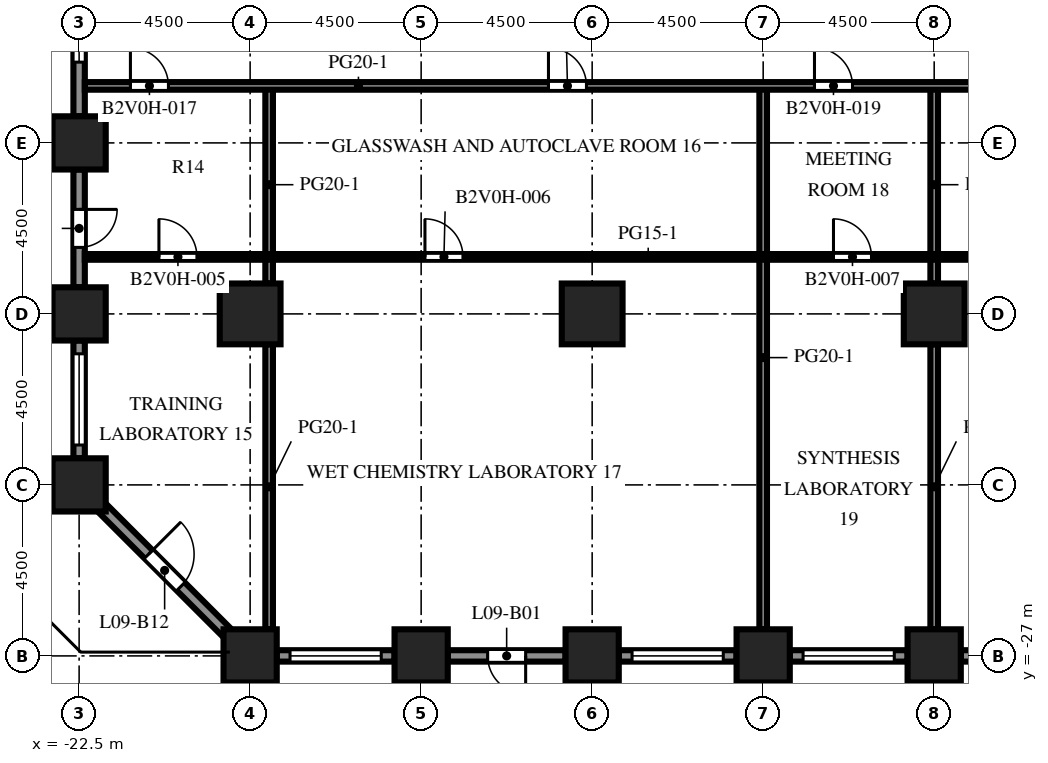
"""IFC4 building model, lengths in metres.
Left out: names, types, materials, properties, quantities, classifications, styles, units other than length and angle.
Written with IfcOpenShell. Run it as: python <this file> out.ifc"""

import sys

from ifc_helpers import new_model, si_unit, direction, frame, frame_2d, origin, origin_2d, place, context, subcontext, project, spatial, rectangle, extrude, element, fill, save


model = new_model("IFC4")
c1 = context("Model", 3, precision=1e-05, world=origin(), true_north=direction((0.0, 1.0)))
c2 = subcontext(c1, "Body", "Model", "MODEL_VIEW")
j1 = project(units=[si_unit("LENGTHUNIT", "METRE"), si_unit("PLANEANGLEUNIT", "RADIAN")], contexts=[c1])
p1 = place(None, origin())
s1 = spatial("IfcSite", under=j1, at=p1, CompositionType="ELEMENT")
p2 = place(p1, origin())
s2 = spatial("IfcBuilding", under=s1, at=p2, CompositionType="ELEMENT")
p3 = place(p2, frame((0.0, 0.0, 41.9)))
s3 = spatial("IfcBuildingStorey", under=s2, at=p3, CompositionType="ELEMENT", Elevation=41.9)
for number, where, z_axis, x_axis in (
    (1, (-22.5, -22.5, -0.45), (0.0, 0.0, 1.0), (1.0, 0.0, 0.0)),
    (2, (-22.5, -18.0, -0.45), (0.0, 0.0, 1.0), (1.0, 0.0, 0.0)),
    (3, (-22.5, -13.5, -0.45), (0.0, 0.0, 1.0), (1.0, 0.0, 0.0)),
):
    element("IfcColumn", number, at=place(p3, frame(where, z_axis=z_axis, x_axis=x_axis)), inside=s3, PredefinedType="COLUMN", context=c2, shape_type="SweptSolid", body=[
        extrude(rectangle(XDim=1.4, YDim=1.4, at=origin_2d()), origin(), (0.0, 0.0, 1.0), 4.55),
    ])
for number, where, z_axis, x_axis in (
    (4, (-18.0, -27.0, 0.0), (0.0, 0.0, 1.0), (1.0, 0.0, 0.0)),
    (5, (-13.5, -27.0, 0.0), (0.0, 0.0, 1.0), (1.0, 0.0, 0.0)),
    (6, (-9.0, -27.0, 0.0), (0.0, 0.0, 1.0), (1.0, 0.0, 0.0)),
    (7, (-4.5, -27.0, 0.0), (0.0, 0.0, 1.0), (1.0, 0.0, 0.0)),
    (8, (0.0, -27.0, 0.0), (0.0, 0.0, 1.0), (1.0, 0.0, 0.0)),
):
    element("IfcColumn", number, at=place(p3, frame(where, z_axis=z_axis, x_axis=x_axis)), inside=s3, PredefinedType="COLUMN", context=c2, shape_type="SweptSolid", body=[
        extrude(rectangle(XDim=1.4, YDim=1.4, at=origin_2d()), origin(), (0.0, 0.0, 1.0), 4.1),
    ])
p4 = place(p3, frame((-18.0, -18.0, -0.45), z_axis=(0.0, 0.0, 1.0), x_axis=(1.0, 0.0, 0.0)))
e9 = element("IfcColumn", 9, at=p4, inside=s3, PredefinedType="COLUMN", context=c2, shape_type="SweptSolid", body=[
    extrude(rectangle(XDim=1.6, YDim=1.6, at=origin_2d()), origin(), (0.0, 0.0, 1.0), 4.55),
])
for number, where, z_axis, x_axis in (
    (10, (-9.0, -18.0, 0.0), (0.0, 0.0, 1.0), (1.0, 0.0, 0.0)),
    (11, (0.0, -18.0, 0.0), (0.0, 0.0, 1.0), (1.0, 0.0, 0.0)),
):
    element("IfcColumn", number, at=place(p3, frame(where, z_axis=z_axis, x_axis=x_axis)), inside=s3, PredefinedType="COLUMN", context=c2, shape_type="SweptSolid", body=[
        extrude(rectangle(XDim=1.6, YDim=1.6, at=origin_2d()), origin(), (0.0, 0.0, 1.0), 4.1),
    ])
p5 = place(p3, frame((-14.2, -27.0, 0.0), z_axis=(0.0, 0.0, 1.0), x_axis=(-1.0, 0.0, 0.0)))
e12 = element("IfcWall", 12, at=p5, inside=s3, PredefinedType="SOLIDWALL", context=c2, shape_type="SweptSolid", body=[
    extrude(rectangle(XDim=3.1, YDim=0.3, at=frame_2d((1.55, 0.0))), origin(), (0.0, 0.0, 1.0), 2.75),
])
p6 = place(p5, frame((0.35, 0.0, 0.8)))
e13 = element("IfcOpeningElement", 13, at=p6, cuts=e12, PredefinedType="OPENING", context=c2, shape_type="SweptSolid", body=[
    extrude(rectangle(XDim=2.4, YDim=1.7, at=frame_2d((1.2, 0.85))), frame((0.0, 0.16, 0.0), z_axis=(0.0, -1.0, 0.0), x_axis=(1.0, 0.0, 0.0)), (0.0, 0.0, 1.0), 0.32),
])
p7 = place(p3, frame((-9.7, -27.0, 0.0), z_axis=(0.0, 0.0, 1.0), x_axis=(-1.0, 0.0, 0.0)))
e14 = element("IfcWall", 14, at=p7, inside=s3, PredefinedType="SOLIDWALL", context=c2, shape_type="SweptSolid", body=[
    extrude(rectangle(XDim=3.1, YDim=0.3, at=frame_2d((1.55, 0.0))), origin(), (0.0, 0.0, 1.0), 2.75),
])
p8 = place(p7, frame((1.05, 0.0, 0.0)))
e15 = element("IfcOpeningElement", 15, at=p8, cuts=e14, PredefinedType="OPENING", context=c2, shape_type="SweptSolid", body=[
    extrude(rectangle(XDim=1.0, YDim=2.2, at=frame_2d((0.5, 1.1))), frame((0.0, 0.16, 0.0), z_axis=(0.0, -1.0, 0.0), x_axis=(1.0, 0.0, 0.0)), (0.0, 0.0, 1.0), 0.32),
])
p9 = place(p3, frame((-5.2, -27.0, 0.0), z_axis=(0.0, 0.0, 1.0), x_axis=(-1.0, 0.0, 0.0)))
e16 = element("IfcWall", 16, at=p9, inside=s3, PredefinedType="SOLIDWALL", context=c2, shape_type="SweptSolid", body=[
    extrude(rectangle(XDim=3.1, YDim=0.3, at=frame_2d((1.55, 0.0))), origin(), (0.0, 0.0, 1.0), 2.75),
])
p10 = place(p9, frame((0.35, 0.0, 0.8)))
e17 = element("IfcOpeningElement", 17, at=p10, cuts=e16, PredefinedType="OPENING", context=c2, shape_type="SweptSolid", body=[
    extrude(rectangle(XDim=2.4, YDim=1.7, at=frame_2d((1.2, 0.85))), frame((0.0, 0.16, 0.0), z_axis=(0.0, -1.0, 0.0), x_axis=(1.0, 0.0, 0.0)), (0.0, 0.0, 1.0), 0.32),
])
p11 = place(p3, frame((-0.7, -27.0, 0.0), z_axis=(0.0, 0.0, 1.0), x_axis=(-1.0, 0.0, 0.0)))
e18 = element("IfcWall", 18, at=p11, inside=s3, PredefinedType="SOLIDWALL", context=c2, shape_type="SweptSolid", body=[
    extrude(rectangle(XDim=3.1, YDim=0.3, at=frame_2d((1.55, 0.0))), origin(), (0.0, 0.0, 1.0), 2.75),
])
p12 = place(p11, frame((0.35, 0.0, 0.8)))
e19 = element("IfcOpeningElement", 19, at=p12, cuts=e18, PredefinedType="OPENING", context=c2, shape_type="SweptSolid", body=[
    extrude(rectangle(XDim=2.4, YDim=1.7, at=frame_2d((1.2, 0.85))), frame((0.0, 0.16, 0.0), z_axis=(0.0, -1.0, 0.0), x_axis=(1.0, 0.0, 0.0)), (0.0, 0.0, 1.0), 0.32),
])
p13 = place(p3, frame((3.8, -27.0, 0.0), z_axis=(0.0, 0.0, 1.0), x_axis=(-1.0, 0.0, 0.0)))
e20 = element("IfcWall", 20, at=p13, inside=s3, PredefinedType="SOLIDWALL", context=c2, shape_type="SweptSolid", body=[
    extrude(rectangle(XDim=3.1, YDim=0.3, at=frame_2d((1.55, 0.0))), origin(), (0.0, 0.0, 1.0), 2.75),
])
p14 = place(p13, frame((0.35, 0.0, 0.8)))
e21 = element("IfcOpeningElement", 21, at=p14, cuts=e20, PredefinedType="OPENING", context=c2, shape_type="SweptSolid", body=[
    extrude(rectangle(XDim=2.4, YDim=1.7, at=frame_2d((1.2, 0.85))), frame((0.0, 0.16, 0.0), z_axis=(0.0, -1.0, 0.0), x_axis=(1.0, 0.0, 0.0)), (0.0, 0.0, 1.0), 0.32),
])
p15 = place(p3, frame((-22.5, -12.8, 0.0), z_axis=(0.0, 0.0, 1.0), x_axis=(0.0, 1.0, 0.0)))
e22 = element("IfcWall", 22, at=p15, inside=s3, PredefinedType="SOLIDWALL", context=c2, shape_type="SweptSolid", body=[
    extrude(rectangle(XDim=3.1, YDim=0.3, at=frame_2d((1.55, 0.0))), origin(), (0.0, 0.0, 1.0), 2.75),
])
p16 = place(p15, frame((1.425, 0.0, 0.8)))
e23 = element("IfcOpeningElement", 23, at=p16, cuts=e22, PredefinedType="OPENING", context=c2, shape_type="SweptSolid", body=[
    extrude(rectangle(XDim=1.2, YDim=1.7, at=frame_2d((0.6, 0.85))), frame((0.0, 0.16, 0.0), z_axis=(0.0, -1.0, 0.0), x_axis=(1.0, 0.0, 0.0)), (0.0, 0.0, 1.0), 0.32),
])
p17 = place(p3, frame((-22.5, -17.3, 0.0), z_axis=(0.0, 0.0, 1.0), x_axis=(0.0, 1.0, 0.0)))
e24 = element("IfcWall", 24, at=p17, inside=s3, PredefinedType="SOLIDWALL", context=c2, shape_type="SweptSolid", body=[
    extrude(rectangle(XDim=3.1, YDim=0.3, at=frame_2d((1.55, 0.0))), origin(), (0.0, 0.0, 1.0), 2.75),
])
p18 = place(p17, frame((1.05, 0.0, 0.0)))
e25 = element("IfcOpeningElement", 25, at=p18, cuts=e24, PredefinedType="OPENING", context=c2, shape_type="SweptSolid", body=[
    extrude(rectangle(XDim=1.0, YDim=2.2, at=frame_2d((0.5, 1.1))), frame((0.0, 0.16, 0.0), z_axis=(0.0, -1.0, 0.0), x_axis=(1.0, 0.0, 0.0)), (0.0, 0.0, 1.0), 0.32),
])
p19 = place(p3, frame((-22.5, -21.8, 0.0), z_axis=(0.0, 0.0, 1.0), x_axis=(0.0, 1.0, 0.0)))
e26 = element("IfcWall", 26, at=p19, inside=s3, PredefinedType="SOLIDWALL", context=c2, shape_type="SweptSolid", body=[
    extrude(rectangle(XDim=3.1, YDim=0.3, at=frame_2d((1.55, 0.0))), origin(), (0.0, 0.0, 1.0), 2.75),
])
p20 = place(p19, frame((0.35, 0.0, 0.8)))
e27 = element("IfcOpeningElement", 27, at=p20, cuts=e26, PredefinedType="OPENING", context=c2, shape_type="SweptSolid", body=[
    extrude(rectangle(XDim=2.4, YDim=1.7, at=frame_2d((1.2, 0.85))), frame((0.0, 0.16, 0.0), z_axis=(0.0, -1.0, 0.0), x_axis=(1.0, 0.0, 0.0)), (0.0, 0.0, 1.0), 0.32),
])
p21 = place(p3, frame((-18.594, -26.406, 0.0), z_axis=(0.0, 0.0, 1.0), x_axis=(-0.707106781187, 0.707106781187, 0.0)))
e28 = element("IfcWall", 28, at=p21, inside=s3, PredefinedType="SOLIDWALL", context=c2, shape_type="SweptSolid", body=[
    extrude(rectangle(XDim=4.684, YDim=0.3, at=frame_2d((2.342, 0.0))), origin(), (0.0, 0.0, 1.0), 2.75),
])
p22 = place(p21, frame((1.742, 0.0, 0.0)))
e29 = element("IfcOpeningElement", 29, at=p22, cuts=e28, PredefinedType="OPENING", context=c2, shape_type="SweptSolid", body=[
    extrude(rectangle(XDim=1.2, YDim=2.2, at=frame_2d((0.6, 1.1))), frame((0.0, 0.16, 0.0), z_axis=(0.0, -1.0, 0.0), x_axis=(1.0, 0.0, 0.0)), (0.0, 0.0, 1.0), 0.32),
])
p23 = place(p3, frame((-17.5, -26.3, 0.0), z_axis=(0.0, 0.0, 1.0), x_axis=(0.0, 1.0, 0.0)))
e30 = element("IfcWall", 30, at=p23, inside=s3, PredefinedType="PARTITIONING", context=c2, shape_type="SweptSolid", body=[
    extrude(rectangle(XDim=7.5, YDim=0.2, at=frame_2d((3.75, 0.0))), origin(), (0.0, 0.0, 1.0), 3.65),
])
p24 = place(p3, frame((-17.5, -17.2, 0.0), z_axis=(0.0, 0.0, 1.0), x_axis=(0.0, 1.0, 0.0)))
e31 = element("IfcWall", 31, at=p24, inside=s3, PredefinedType="PARTITIONING", context=c2, shape_type="SweptSolid", body=[
    extrude(rectangle(XDim=5.2, YDim=0.2, at=frame_2d((2.6, 0.0))), origin(), (0.0, 0.0, 1.0), 3.65),
])
p25 = place(p3, frame((-4.5, -26.3, 0.0), z_axis=(0.0, 0.0, 1.0), x_axis=(0.0, 1.0, 0.0)))
e32 = element("IfcWall", 32, at=p25, inside=s3, PredefinedType="PARTITIONING", context=c2, shape_type="SweptSolid", body=[
    extrude(rectangle(XDim=14.3, YDim=0.2, at=frame_2d((7.15, 0.0))), origin(), (0.0, 0.0, 1.0), 3.65),
])
p26 = place(p3, frame((0.0, -26.3, 0.0), z_axis=(0.0, 0.0, 1.0), x_axis=(0.0, 1.0, 0.0)))
e33 = element("IfcWall", 33, at=p26, inside=s3, PredefinedType="PARTITIONING", context=c2, shape_type="SweptSolid", body=[
    extrude(rectangle(XDim=7.5, YDim=0.2, at=frame_2d((3.75, 0.0))), origin(), (0.0, 0.0, 1.0), 3.65),
])
p27 = place(p3, frame((0.0, -17.2, 0.0), z_axis=(0.0, 0.0, 1.0), x_axis=(0.0, 1.0, 0.0)))
e34 = element("IfcWall", 34, at=p27, inside=s3, PredefinedType="PARTITIONING", context=c2, shape_type="SweptSolid", body=[
    extrude(rectangle(XDim=5.2, YDim=0.2, at=frame_2d((2.6, 0.0))), origin(), (0.0, 0.0, 1.0), 3.65),
])
p28 = place(p3, frame((31.35, -16.5, 0.0), z_axis=(0.0, 0.0, 1.0), x_axis=(-1.0, 0.0, 0.0)))
e35 = element("IfcWall", 35, at=p28, inside=s3, PredefinedType="PARTITIONING", context=c2, shape_type="SweptSolid", body=[
    extrude(rectangle(XDim=53.7, YDim=0.15, at=frame_2d((26.85, 0.0))), origin(), (0.0, 0.0, 1.0), 3.65),
])
p29 = place(p28, frame((50.75, 0.0, 0.0)))
e36 = element("IfcOpeningElement", 36, at=p29, cuts=e35, PredefinedType="OPENING", context=c2, shape_type="SweptSolid", body=[
    extrude(rectangle(XDim=1.0, YDim=2.1, at=frame_2d((0.5, 1.05))), frame((0.0, 0.085, 0.0), z_axis=(0.0, -1.0, 0.0), x_axis=(1.0, 0.0, 0.0)), (0.0, 0.0, 1.0), 0.17),
])
p30 = place(p28, frame((43.75, 0.0, 0.0)))
e37 = element("IfcOpeningElement", 37, at=p30, cuts=e35, PredefinedType="OPENING", context=c2, shape_type="SweptSolid", body=[
    extrude(rectangle(XDim=1.0, YDim=2.1, at=frame_2d((0.5, 1.05))), frame((0.0, 0.085, 0.0), z_axis=(0.0, -1.0, 0.0), x_axis=(1.0, 0.0, 0.0)), (0.0, 0.0, 1.0), 0.17),
])
p31 = place(p28, frame((33.0, 0.0, 0.0)))
e38 = element("IfcOpeningElement", 38, at=p31, cuts=e35, PredefinedType="OPENING", context=c2, shape_type="SweptSolid", body=[
    extrude(rectangle(XDim=1.0, YDim=2.1, at=frame_2d((0.5, 1.05))), frame((0.0, 0.085, 0.0), z_axis=(0.0, -1.0, 0.0), x_axis=(1.0, 0.0, 0.0)), (0.0, 0.0, 1.0), 0.17),
])
p32 = place(p28, frame((26.25, 0.0, 0.0)))
e39 = element("IfcOpeningElement", 39, at=p32, cuts=e35, PredefinedType="OPENING", context=c2, shape_type="SweptSolid", body=[
    extrude(rectangle(XDim=1.0, YDim=2.1, at=frame_2d((0.5, 1.05))), frame((0.0, 0.085, 0.0), z_axis=(0.0, -1.0, 0.0), x_axis=(1.0, 0.0, 0.0)), (0.0, 0.0, 1.0), 0.17),
])
p33 = place(p28, frame((19.75, 0.0, 0.0)))
e40 = element("IfcOpeningElement", 40, at=p33, cuts=e35, PredefinedType="OPENING", context=c2, shape_type="SweptSolid", body=[
    extrude(rectangle(XDim=1.0, YDim=2.1, at=frame_2d((0.5, 1.05))), frame((0.0, 0.085, 0.0), z_axis=(0.0, -1.0, 0.0), x_axis=(1.0, 0.0, 0.0)), (0.0, 0.0, 1.0), 0.17),
])
p34 = place(p28, frame((15.25, 0.0, 0.0)))
e41 = element("IfcOpeningElement", 41, at=p34, cuts=e35, PredefinedType="OPENING", context=c2, shape_type="SweptSolid", body=[
    extrude(rectangle(XDim=1.0, YDim=2.1, at=frame_2d((0.5, 1.05))), frame((0.0, 0.085, 0.0), z_axis=(0.0, -1.0, 0.0), x_axis=(1.0, 0.0, 0.0)), (0.0, 0.0, 1.0), 0.17),
])
p35 = place(p28, frame((10.75, 0.0, 0.0)))
e42 = element("IfcOpeningElement", 42, at=p35, cuts=e35, PredefinedType="OPENING", context=c2, shape_type="SweptSolid", body=[
    extrude(rectangle(XDim=1.0, YDim=2.1, at=frame_2d((0.5, 1.05))), frame((0.0, 0.085, 0.0), z_axis=(0.0, -1.0, 0.0), x_axis=(1.0, 0.0, 0.0)), (0.0, 0.0, 1.0), 0.17),
])
p36 = place(p28, frame((2.5, 0.0, 0.0)))
e43 = element("IfcOpeningElement", 43, at=p36, cuts=e35, PredefinedType="OPENING", context=c2, shape_type="SweptSolid", body=[
    extrude(rectangle(XDim=1.0, YDim=2.1, at=frame_2d((0.5, 1.05))), frame((0.0, 0.085, 0.0), z_axis=(0.0, -1.0, 0.0), x_axis=(1.0, 0.0, 0.0)), (0.0, 0.0, 1.0), 0.17),
])
p37 = place(p3, frame((31.35, -12.0, 0.0), z_axis=(0.0, 0.0, 1.0), x_axis=(-1.0, 0.0, 0.0)))
e44 = element("IfcWall", 44, at=p37, inside=s3, PredefinedType="PARTITIONING", context=c2, shape_type="SweptSolid", body=[
    extrude(rectangle(XDim=53.7, YDim=0.2, at=frame_2d((26.85, 0.0))), origin(), (0.0, 0.0, 1.0), 3.65),
])
p38 = place(p37, frame((51.5, 0.0, 0.0)))
e45 = element("IfcOpeningElement", 45, at=p38, cuts=e44, PredefinedType="OPENING", context=c2, shape_type="SweptSolid", body=[
    extrude(rectangle(XDim=1.0, YDim=2.1, at=frame_2d((0.5, 1.05))), frame((0.0, 0.11, 0.0), z_axis=(0.0, -1.0, 0.0), x_axis=(1.0, 0.0, 0.0)), (0.0, 0.0, 1.0), 0.22),
])
p39 = place(p37, frame((40.5, 0.0, 0.0)))
e46 = element("IfcOpeningElement", 46, at=p39, cuts=e44, PredefinedType="OPENING", context=c2, shape_type="SweptSolid", body=[
    extrude(rectangle(XDim=1.0, YDim=2.1, at=frame_2d((0.5, 1.05))), frame((0.0, 0.11, 0.0), z_axis=(0.0, -1.0, 0.0), x_axis=(1.0, 0.0, 0.0)), (0.0, 0.0, 1.0), 0.22),
])
p40 = place(p37, frame((33.5, 0.0, 0.0)))
e47 = element("IfcOpeningElement", 47, at=p40, cuts=e44, PredefinedType="OPENING", context=c2, shape_type="SweptSolid", body=[
    extrude(rectangle(XDim=1.0, YDim=2.1, at=frame_2d((0.5, 1.05))), frame((0.0, 0.11, 0.0), z_axis=(0.0, -1.0, 0.0), x_axis=(1.0, 0.0, 0.0)), (0.0, 0.0, 1.0), 0.22),
])
p41 = place(p37, frame((25.75, 0.0, 0.0)))
e48 = element("IfcOpeningElement", 48, at=p41, cuts=e44, PredefinedType="OPENING", context=c2, shape_type="SweptSolid", body=[
    extrude(rectangle(XDim=1.0, YDim=2.1, at=frame_2d((0.5, 1.05))), frame((0.0, 0.11, 0.0), z_axis=(0.0, -1.0, 0.0), x_axis=(1.0, 0.0, 0.0)), (0.0, 0.0, 1.0), 0.22),
])
p42 = place(p37, frame((19.75, 0.0, 0.0)))
e49 = element("IfcOpeningElement", 49, at=p42, cuts=e44, PredefinedType="OPENING", context=c2, shape_type="SweptSolid", body=[
    extrude(rectangle(XDim=1.0, YDim=2.1, at=frame_2d((0.5, 1.05))), frame((0.0, 0.11, 0.0), z_axis=(0.0, -1.0, 0.0), x_axis=(1.0, 0.0, 0.0)), (0.0, 0.0, 1.0), 0.22),
])
p43 = place(p37, frame((15.75, 0.0, 0.0)))
e50 = element("IfcOpeningElement", 50, at=p43, cuts=e44, PredefinedType="OPENING", context=c2, shape_type="SweptSolid", body=[
    extrude(rectangle(XDim=1.0, YDim=2.1, at=frame_2d((0.5, 1.05))), frame((0.0, 0.11, 0.0), z_axis=(0.0, -1.0, 0.0), x_axis=(1.0, 0.0, 0.0)), (0.0, 0.0, 1.0), 0.22),
])
p44 = place(p37, frame((10.5, 0.0, 0.0)))
e51 = element("IfcOpeningElement", 51, at=p44, cuts=e44, PredefinedType="OPENING", context=c2, shape_type="SweptSolid", body=[
    extrude(rectangle(XDim=1.0, YDim=2.1, at=frame_2d((0.5, 1.05))), frame((0.0, 0.11, 0.0), z_axis=(0.0, -1.0, 0.0), x_axis=(1.0, 0.0, 0.0)), (0.0, 0.0, 1.0), 0.22),
])
p45 = place(p37, frame((5.25, 0.0, 0.0)))
e52 = element("IfcOpeningElement", 52, at=p45, cuts=e44, PredefinedType="OPENING", context=c2, shape_type="SweptSolid", body=[
    extrude(rectangle(XDim=1.0, YDim=2.1, at=frame_2d((0.5, 1.05))), frame((0.0, 0.11, 0.0), z_axis=(0.0, -1.0, 0.0), x_axis=(1.0, 0.0, 0.0)), (0.0, 0.0, 1.0), 0.22),
])
p46 = place(p6, origin())
e53 = element("IfcWindow", 53, at=p46, inside=s3, PartitioningType="SINGLE_PANEL", PredefinedType="WINDOW", context=c2, shape_type="SweptSolid", body=[
    extrude(rectangle(XDim=2.4, YDim=1.7, at=frame_2d((1.2, 0.85))), frame((0.0, 0.03, 0.0), z_axis=(0.0, -1.0, 0.0), x_axis=(1.0, 0.0, 0.0)), (0.0, 0.0, 1.0), 0.06),
])
fill(e13, e53)
p47 = place(p8, origin())
e54 = element("IfcDoor", 54, at=p47, inside=s3, OperationType="SINGLE_SWING_LEFT", PredefinedType="DOOR", context=c2, shape_type="SweptSolid", body=[
    extrude(rectangle(XDim=1.0, YDim=2.2, at=frame_2d((0.5, 1.1))), frame((0.0, 0.025, 0.0), z_axis=(0.0, -1.0, 0.0), x_axis=(1.0, 0.0, 0.0)), (0.0, 0.0, 1.0), 0.05),
])
fill(e15, e54)
p48 = place(p10, origin())
e55 = element("IfcWindow", 55, at=p48, inside=s3, PartitioningType="SINGLE_PANEL", PredefinedType="WINDOW", context=c2, shape_type="SweptSolid", body=[
    extrude(rectangle(XDim=2.4, YDim=1.7, at=frame_2d((1.2, 0.85))), frame((0.0, 0.03, 0.0), z_axis=(0.0, -1.0, 0.0), x_axis=(1.0, 0.0, 0.0)), (0.0, 0.0, 1.0), 0.06),
])
fill(e17, e55)
p49 = place(p12, origin())
e56 = element("IfcWindow", 56, at=p49, inside=s3, PartitioningType="SINGLE_PANEL", PredefinedType="WINDOW", context=c2, shape_type="SweptSolid", body=[
    extrude(rectangle(XDim=2.4, YDim=1.7, at=frame_2d((1.2, 0.85))), frame((0.0, 0.03, 0.0), z_axis=(0.0, -1.0, 0.0), x_axis=(1.0, 0.0, 0.0)), (0.0, 0.0, 1.0), 0.06),
])
fill(e19, e56)
p50 = place(p16, origin())
e57 = element("IfcWindow", 57, at=p50, inside=s3, PartitioningType="SINGLE_PANEL", PredefinedType="WINDOW", context=c2, shape_type="SweptSolid", body=[
    extrude(rectangle(XDim=1.2, YDim=1.7, at=frame_2d((0.6, 0.85))), frame((0.0, 0.03, 0.0), z_axis=(0.0, -1.0, 0.0), x_axis=(1.0, 0.0, 0.0)), (0.0, 0.0, 1.0), 0.06),
])
fill(e23, e57)
p51 = place(p18, origin())
e58 = element("IfcDoor", 58, at=p51, inside=s3, OperationType="SINGLE_SWING_RIGHT", PredefinedType="DOOR", context=c2, shape_type="SweptSolid", body=[
    extrude(rectangle(XDim=1.0, YDim=2.2, at=frame_2d((0.5, 1.1))), frame((0.0, 0.025, 0.0), z_axis=(0.0, -1.0, 0.0), x_axis=(1.0, 0.0, 0.0)), (0.0, 0.0, 1.0), 0.05),
])
fill(e25, e58)
p52 = place(p20, origin())
e59 = element("IfcWindow", 59, at=p52, inside=s3, PartitioningType="SINGLE_PANEL", PredefinedType="WINDOW", context=c2, shape_type="SweptSolid", body=[
    extrude(rectangle(XDim=2.4, YDim=1.7, at=frame_2d((1.2, 0.85))), frame((0.0, 0.03, 0.0), z_axis=(0.0, -1.0, 0.0), x_axis=(1.0, 0.0, 0.0)), (0.0, 0.0, 1.0), 0.06),
])
fill(e27, e59)
p53 = place(p22, origin())
e60 = element("IfcDoor", 60, at=p53, inside=s3, OperationType="SINGLE_SWING_RIGHT", PredefinedType="DOOR", context=c2, shape_type="SweptSolid", body=[
    extrude(rectangle(XDim=1.2, YDim=2.2, at=frame_2d((0.6, 1.1))), frame((0.0, 0.025, 0.0), z_axis=(0.0, -1.0, 0.0), x_axis=(1.0, 0.0, 0.0)), (0.0, 0.0, 1.0), 0.05),
])
fill(e29, e60)
p54 = place(p29, origin())
e61 = element("IfcDoor", 61, at=p54, inside=s3, OperationType="SINGLE_SWING_RIGHT", PredefinedType="DOOR", context=c2, shape_type="SweptSolid", body=[
    extrude(rectangle(XDim=1.0, YDim=2.1, at=frame_2d((0.5, 1.05))), frame((0.0, 0.025, 0.0), z_axis=(0.0, -1.0, 0.0), x_axis=(1.0, 0.0, 0.0)), (0.0, 0.0, 1.0), 0.05),
])
fill(e36, e61)
p55 = place(p30, origin())
e62 = element("IfcDoor", 62, at=p55, inside=s3, OperationType="SINGLE_SWING_RIGHT", PredefinedType="DOOR", context=c2, shape_type="SweptSolid", body=[
    extrude(rectangle(XDim=1.0, YDim=2.1, at=frame_2d((0.5, 1.05))), frame((0.0, 0.025, 0.0), z_axis=(0.0, -1.0, 0.0), x_axis=(1.0, 0.0, 0.0)), (0.0, 0.0, 1.0), 0.05),
])
fill(e37, e62)
p56 = place(p31, origin())
e63 = element("IfcDoor", 63, at=p56, inside=s3, OperationType="SINGLE_SWING_RIGHT", PredefinedType="DOOR", context=c2, shape_type="SweptSolid", body=[
    extrude(rectangle(XDim=1.0, YDim=2.1, at=frame_2d((0.5, 1.05))), frame((0.0, 0.025, 0.0), z_axis=(0.0, -1.0, 0.0), x_axis=(1.0, 0.0, 0.0)), (0.0, 0.0, 1.0), 0.05),
])
fill(e38, e63)
p57 = place(p38, origin())
e64 = element("IfcDoor", 64, at=p57, inside=s3, OperationType="SINGLE_SWING_RIGHT", PredefinedType="DOOR", context=c2, shape_type="SweptSolid", body=[
    extrude(rectangle(XDim=1.0, YDim=2.1, at=frame_2d((0.5, 1.05))), frame((0.0, 0.025, 0.0), z_axis=(0.0, -1.0, 0.0), x_axis=(1.0, 0.0, 0.0)), (0.0, 0.0, 1.0), 0.05),
])
fill(e45, e64)
p58 = place(p39, origin())
e65 = element("IfcDoor", 65, at=p58, inside=s3, OperationType="SINGLE_SWING_RIGHT", PredefinedType="DOOR", context=c2, shape_type="SweptSolid", body=[
    extrude(rectangle(XDim=1.0, YDim=2.1, at=frame_2d((0.5, 1.05))), frame((0.0, 0.025, 0.0), z_axis=(0.0, -1.0, 0.0), x_axis=(1.0, 0.0, 0.0)), (0.0, 0.0, 1.0), 0.05),
])
fill(e46, e65)
p59 = place(p40, origin())
e66 = element("IfcDoor", 66, at=p59, inside=s3, OperationType="SINGLE_SWING_RIGHT", PredefinedType="DOOR", context=c2, shape_type="SweptSolid", body=[
    extrude(rectangle(XDim=1.0, YDim=2.1, at=frame_2d((0.5, 1.05))), frame((0.0, 0.025, 0.0), z_axis=(0.0, -1.0, 0.0), x_axis=(1.0, 0.0, 0.0)), (0.0, 0.0, 1.0), 0.05),
])
fill(e47, e66)
save(model, sys.argv[1])
